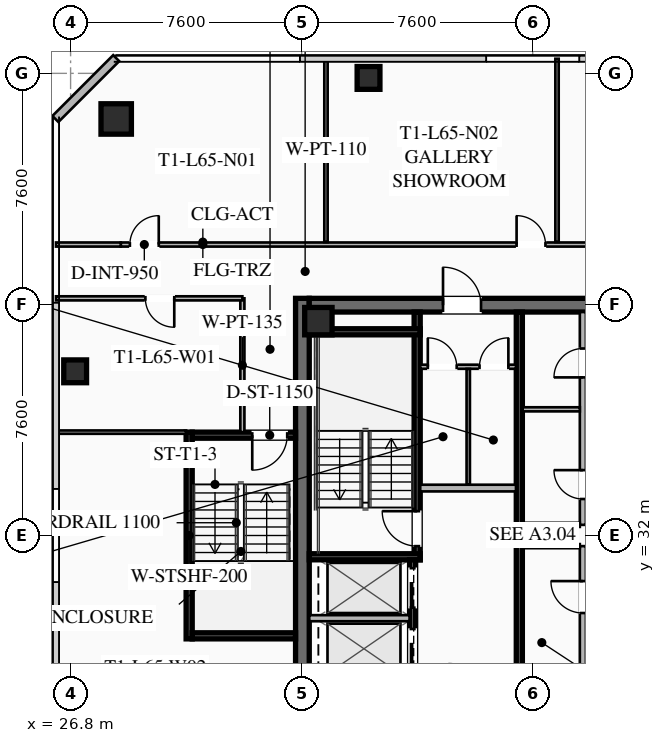
"""IFC4 building model, lengths in metres.
Left out: names, types, materials, properties, quantities, classifications, styles, units other than length and angle.
Written with IfcOpenShell. Run it as: python <this file> out.ifc"""

import sys

from ifc_helpers import new_model, si_unit, direction, frame, frame_2d, origin, origin_2d, place, context, subcontext, project, spatial, rectangle, hollow_rectangle, extrude, element, fill, save


model = new_model("IFC4")
c1 = context("Model", 3, precision=1e-05, world=origin(), true_north=direction((0.0, 1.0)))
c2 = subcontext(c1, "Body", "Model", "MODEL_VIEW")
j1 = project(units=[si_unit("LENGTHUNIT", "METRE"), si_unit("PLANEANGLEUNIT", "RADIAN")], contexts=[c1])
p1 = place(None, origin())
s1 = spatial("IfcSite", under=j1, at=p1, CompositionType="ELEMENT")
p2 = place(p1, origin())
s2 = spatial("IfcBuilding", under=s1, at=p2, CompositionType="ELEMENT")
p3 = place(p2, frame((0.0, 0.0, 239.7)))
s3 = spatial("IfcBuildingStorey", under=s2, at=p3, CompositionType="ELEMENT", Elevation=239.7)
p4 = place(p3, frame((34.425, 24.2, 0.0), z_axis=(0.0, 0.0, 1.0), x_axis=(0.0, 1.0, 0.0)))
e1 = element("IfcWall", 1, at=p4, inside=s3, PredefinedType="SHEAR", context=c2, shape_type="SweptSolid", body=[
    extrude(rectangle(XDim=15.6, YDim=0.45, at=frame_2d((7.8, 0.0))), origin(), (0.0, 0.0, 1.0), 3.55),
])
p5 = place(p3, frame((34.65, 39.575, 0.0), z_axis=(0.0, 0.0, 1.0), x_axis=(1.0, 0.0, 0.0)))
e2 = element("IfcWall", 2, at=p5, inside=s3, PredefinedType="SHEAR", context=c2, shape_type="SweptSolid", body=[
    extrude(rectangle(XDim=14.7, YDim=0.45, at=frame_2d((7.35, 0.0))), origin(), (0.0, 0.0, 1.0), 3.55),
])
p6 = place(p5, frame((4.4, 0.0, 0.0)))
e3 = element("IfcOpeningElement", 3, at=p6, cuts=e2, PredefinedType="OPENING", context=c2, shape_type="SweptSolid", body=[
    extrude(rectangle(XDim=1.25, YDim=2.25, at=frame_2d((0.625, 1.125))), frame((0.0, 0.235, 0.0), z_axis=(0.0, -1.0, 0.0), x_axis=(1.0, 0.0, 0.0)), (0.0, 0.0, 1.0), 0.47),
])
p7 = place(p5, frame((9.45, 0.0, 0.0)))
e4 = element("IfcOpeningElement", 4, at=p7, cuts=e2, PredefinedType="OPENING", context=c2, shape_type="SweptSolid", body=[
    extrude(rectangle(XDim=1.25, YDim=2.25, at=frame_2d((0.625, 1.125))), frame((0.0, 0.235, 0.0), z_axis=(0.0, -1.0, 0.0), x_axis=(1.0, 0.0, 0.0)), (0.0, 0.0, 1.0), 0.47),
])
p8 = place(p3, frame((34.95, 39.05, 0.0), z_axis=(0.0, 0.0, 1.0), x_axis=(1.0, 0.0, 0.0)))
e5 = element("IfcColumn", 5, at=p8, inside=s3, PredefinedType="COLUMN", context=c2, shape_type="SweptSolid", body=[
    extrude(hollow_rectangle(XDim=0.9, YDim=0.9, WallThickness=0.04, at=origin_2d()), origin(), (0.0, 0.0, 1.0), 3.37),
])
p9 = place(p3, frame((28.3, 45.7, 0.0), z_axis=(0.0, 0.0, 1.0), x_axis=(1.0, 0.0, 0.0)))
e6 = element("IfcColumn", 6, at=p9, inside=s3, PredefinedType="COLUMN", context=c2, shape_type="SweptSolid", body=[
    extrude(hollow_rectangle(XDim=1.0, YDim=1.0, WallThickness=0.04, at=origin_2d()), origin(), (0.0, 0.0, 1.0), 3.37),
])
for number, where, z_axis, x_axis in (
    (7, (36.6, 47.05, 0.0), (0.0, 0.0, 1.0), (1.0, 0.0, 0.0)),
    (8, (26.95, 37.4, 0.0), (0.0, 0.0, 1.0), (1.0, 0.0, 0.0)),
):
    element("IfcColumn", number, at=place(p3, frame(where, z_axis=z_axis, x_axis=x_axis)), inside=s3, PredefinedType="COLUMN", context=c2, shape_type="SweptSolid", body=[
        extrude(hollow_rectangle(XDim=0.75, YDim=0.75, WallThickness=0.032, at=origin_2d()), origin(), (0.0, 0.0, 1.0), 3.37),
    ])
p10 = place(p3, frame((26.3, 45.7, 0.0), z_axis=(0.0, 0.0, 1.0), x_axis=(0.707106781187, 0.707106781187, 0.0)))
e9 = element("IfcWall", 9, at=p10, inside=s3, PredefinedType="SOLIDWALL", context=c2, shape_type="SweptSolid", body=[
    extrude(rectangle(XDim=2.828, YDim=0.28, at=frame_2d((1.414, 0.0))), origin(), (0.0, 0.0, 1.0), 3.37),
])
p11 = place(p3, frame((38.2, 31.2, 0.0), z_axis=(0.0, 0.0, 1.0), x_axis=(0.0, 1.0, 0.0)))
e10 = element("IfcWall", 10, at=p11, inside=s3, PredefinedType="SHEAR", context=c2, shape_type="SweptSolid", body=[
    extrude(rectangle(XDim=8.15, YDim=0.2, at=frame_2d((4.075, 0.0))), origin(), (0.0, 0.0, 1.0), 3.37),
])
p12 = place(p11, frame((0.45, 0.0, 0.0)))
e11 = element("IfcOpeningElement", 11, at=p12, cuts=e10, PredefinedType="OPENING", context=c2, shape_type="SweptSolid", body=[
    extrude(rectangle(XDim=1.15, YDim=2.2, at=frame_2d((0.575, 1.1))), frame((0.0, 0.11, 0.0), z_axis=(0.0, -1.0, 0.0), x_axis=(1.0, 0.0, 0.0)), (0.0, 0.0, 1.0), 0.22),
])
for number, where, z_axis, x_axis in (
    (12, (34.65, 31.3, 0.0), (0.0, 0.0, 1.0), (1.0, 0.0, 0.0)),
    (13, (34.65, 38.7, 0.0), (0.0, 0.0, 1.0), (1.0, 0.0, 0.0)),
):
    element("IfcWall", number, at=place(p3, frame(where, z_axis=z_axis, x_axis=x_axis)), inside=s3, PredefinedType="SHEAR", context=c2, shape_type="SweptSolid", body=[
        extrude(rectangle(XDim=3.65, YDim=0.2, at=frame_2d((1.825, 0.0))), origin(), (0.0, 0.0, 1.0), 3.37),
    ])
p13 = place(p3, frame((41.56, 24.65, 0.0), z_axis=(0.0, 0.0, 1.0), x_axis=(0.0, 1.0, 0.0)))
e14 = element("IfcWall", 14, at=p13, inside=s3, PredefinedType="SHEAR", context=c2, shape_type="SweptSolid", body=[
    extrude(rectangle(XDim=14.7, YDim=0.2, at=frame_2d((7.35, 0.0))), origin(), (0.0, 0.0, 1.0), 3.37),
])
p14 = place(p3, frame((38.3, 33.56, 0.0), z_axis=(0.0, 0.0, 1.0), x_axis=(1.0, 0.0, 0.0)))
e15 = element("IfcWall", 15, at=p14, inside=s3, PredefinedType="SOLIDWALL", context=c2, shape_type="SweptSolid", body=[
    extrude(rectangle(XDim=3.15, YDim=0.22, at=frame_2d((1.575, 0.0))), origin(), (0.0, 0.0, 1.0), 2.723),
])
p15 = place(p3, frame((38.05, 24.65, 0.0), z_axis=(0.0, 0.0, 1.0), x_axis=(0.0, 1.0, 0.0)))
e16 = element("IfcWall", 16, at=p15, inside=s3, PredefinedType="SHEAR", context=c2, shape_type="SweptSolid", body=[
    extrude(rectangle(XDim=6.55, YDim=0.2, at=frame_2d((3.275, 0.0))), origin(), (0.0, 0.0, 1.0), 3.37),
])
p16 = place(p15, frame((4.975, 0.0, 0.0)))
e17 = element("IfcOpeningElement", 17, at=p16, cuts=e16, PredefinedType="OPENING", context=c2, shape_type="SweptSolid", body=[
    extrude(rectangle(XDim=1.3, YDim=2.25, at=frame_2d((0.65, 1.125))), frame((0.0, 0.11, 0.0), z_axis=(0.0, -1.0, 0.0), x_axis=(1.0, 0.0, 0.0)), (0.0, 0.0, 1.0), 0.22),
])
p17 = place(p15, frame((2.975, 0.0, 0.0)))
e18 = element("IfcOpeningElement", 18, at=p17, cuts=e16, PredefinedType="OPENING", context=c2, shape_type="SweptSolid", body=[
    extrude(rectangle(XDim=1.3, YDim=2.25, at=frame_2d((0.65, 1.125))), frame((0.0, 0.11, 0.0), z_axis=(0.0, -1.0, 0.0), x_axis=(1.0, 0.0, 0.0)), (0.0, 0.0, 1.0), 0.22),
])
p18 = place(p15, frame((0.775, 0.0, 0.0)))
e19 = element("IfcOpeningElement", 19, at=p18, cuts=e16, PredefinedType="OPENING", context=c2, shape_type="SweptSolid", body=[
    extrude(rectangle(XDim=1.3, YDim=2.25, at=frame_2d((0.65, 1.125))), frame((0.0, 0.11, 0.0), z_axis=(0.0, -1.0, 0.0), x_axis=(1.0, 0.0, 0.0)), (0.0, 0.0, 1.0), 0.22),
])
p19 = place(p3, frame((34.65, 29.28, 0.0), z_axis=(0.0, 0.0, 1.0), x_axis=(1.0, 0.0, 0.0)))
e20 = element("IfcWall", 20, at=p19, inside=s3, PredefinedType="SOLIDWALL", context=c2, shape_type="SweptSolid", body=[
    extrude(rectangle(XDim=3.3, YDim=0.2, at=frame_2d((1.65, 0.0))), origin(), (0.0, 0.0, 1.0), 3.37),
])
p20 = place(p3, frame((38.3, 37.55, 0.0), z_axis=(0.0, 0.0, 1.0), x_axis=(1.0, 0.0, 0.0)))
e21 = element("IfcWall", 21, at=p20, inside=s3, PredefinedType="PARTITIONING", context=c2, shape_type="SweptSolid", body=[
    extrude(rectangle(XDim=3.15, YDim=0.135, at=frame_2d((1.575, 0.0))), origin(), (0.0, 0.0, 1.0), 2.723),
])
p21 = place(p20, frame((0.25, 0.0, 0.0)))
e22 = element("IfcOpeningElement", 22, at=p21, cuts=e21, PredefinedType="OPENING", context=c2, shape_type="SweptSolid", body=[
    extrude(rectangle(XDim=0.95, YDim=2.05, at=frame_2d((0.475, 1.025))), frame((0.0, 0.077, 0.0), z_axis=(0.0, -1.0, 0.0), x_axis=(1.0, 0.0, 0.0)), (0.0, 0.0, 1.0), 0.155),
])
p22 = place(p20, frame((1.95, 0.0, 0.0)))
e23 = element("IfcOpeningElement", 23, at=p22, cuts=e21, PredefinedType="OPENING", context=c2, shape_type="SweptSolid", body=[
    extrude(rectangle(XDim=0.95, YDim=2.05, at=frame_2d((0.475, 1.025))), frame((0.0, 0.077, 0.0), z_axis=(0.0, -1.0, 0.0), x_axis=(1.0, 0.0, 0.0)), (0.0, 0.0, 1.0), 0.155),
])
p23 = place(p3, frame((39.88, 33.68, 0.0), z_axis=(0.0, 0.0, 1.0), x_axis=(0.0, 1.0, 0.0)))
e24 = element("IfcWall", 24, at=p23, inside=s3, PredefinedType="PARTITIONING", context=c2, shape_type="SweptSolid", body=[
    extrude(rectangle(XDim=3.8, YDim=0.11, at=frame_2d((1.9, 0.0))), origin(), (0.0, 0.0, 1.0), 2.723),
])
p24 = place(p3, frame((43.65, 24.65, 0.0), z_axis=(0.0, 0.0, 1.0), x_axis=(0.0, 1.0, 0.0)))
e25 = element("IfcWall", 25, at=p24, inside=s3, PredefinedType="SOLIDWALL", context=c2, shape_type="SweptSolid", body=[
    extrude(rectangle(XDim=7.0, YDim=0.2, at=frame_2d((3.5, 0.0))), origin(), (0.0, 0.0, 1.0), 2.723),
])
p25 = place(p24, frame((0.85, 0.0, 0.0)))
e26 = element("IfcOpeningElement", 26, at=p25, cuts=e25, PredefinedType="OPENING", context=c2, shape_type="SweptSolid", body=[
    extrude(rectangle(XDim=0.95, YDim=2.05, at=frame_2d((0.475, 1.025))), frame((0.0, 0.11, 0.0), z_axis=(0.0, -1.0, 0.0), x_axis=(1.0, 0.0, 0.0)), (0.0, 0.0, 1.0), 0.22),
])
p26 = place(p24, frame((4.8, 0.0, 0.0)))
e27 = element("IfcOpeningElement", 27, at=p26, cuts=e25, PredefinedType="OPENING", context=c2, shape_type="SweptSolid", body=[
    extrude(rectangle(XDim=1.05, YDim=2.2, at=frame_2d((0.525, 1.1))), frame((0.0, 0.11, 0.0), z_axis=(0.0, -1.0, 0.0), x_axis=(1.0, 0.0, 0.0)), (0.0, 0.0, 1.0), 0.22),
])
p27 = place(p3, frame((41.67, 31.65, 0.0), z_axis=(0.0, 0.0, 1.0), x_axis=(1.0, 0.0, 0.0)))
e28 = element("IfcWall", 28, at=p27, inside=s3, PredefinedType="PARTITIONING", context=c2, shape_type="SweptSolid", body=[
    extrude(rectangle(XDim=1.88, YDim=0.135, at=frame_2d((0.94, 0.0))), origin(), (0.0, 0.0, 1.0), 2.723),
])
p28 = place(p3, frame((43.65, 32.35, 0.0), z_axis=(0.0, 0.0, 1.0), x_axis=(0.0, 1.0, 0.0)))
e29 = element("IfcWall", 29, at=p28, inside=s3, PredefinedType="SOLIDWALL", context=c2, shape_type="SweptSolid", body=[
    extrude(rectangle(XDim=7.0, YDim=0.2, at=frame_2d((3.5, 0.0))), origin(), (0.0, 0.0, 1.0), 2.723),
])
p29 = place(p28, frame((0.85, 0.0, 0.0)))
e30 = element("IfcOpeningElement", 30, at=p29, cuts=e29, PredefinedType="OPENING", context=c2, shape_type="SweptSolid", body=[
    extrude(rectangle(XDim=0.95, YDim=2.05, at=frame_2d((0.475, 1.025))), frame((0.0, 0.11, 0.0), z_axis=(0.0, -1.0, 0.0), x_axis=(1.0, 0.0, 0.0)), (0.0, 0.0, 1.0), 0.22),
])
p30 = place(p28, frame((4.85, 0.0, 0.0)))
e31 = element("IfcOpeningElement", 31, at=p30, cuts=e29, PredefinedType="OPENING", context=c2, shape_type="SweptSolid", body=[
    extrude(rectangle(XDim=0.95, YDim=2.05, at=frame_2d((0.475, 1.025))), frame((0.0, 0.11, 0.0), z_axis=(0.0, -1.0, 0.0), x_axis=(1.0, 0.0, 0.0)), (0.0, 0.0, 1.0), 0.22),
])
for number, where, z_axis, x_axis in (
    (32, (41.67, 32.35, 0.0), (0.0, 0.0, 1.0), (1.0, 0.0, 0.0)),
    (33, (41.67, 36.15, 0.0), (0.0, 0.0, 1.0), (1.0, 0.0, 0.0)),
):
    element("IfcWall", number, at=place(p3, frame(where, z_axis=z_axis, x_axis=x_axis)), inside=s3, PredefinedType="PARTITIONING", context=c2, shape_type="SweptSolid", body=[
        extrude(rectangle(XDim=1.88, YDim=0.135, at=frame_2d((0.94, 0.0))), origin(), (0.0, 0.0, 1.0), 2.723),
    ])
p31 = place(p3, frame((30.7, 28.6, 0.0), z_axis=(0.0, 0.0, 1.0), x_axis=(0.0, 1.0, 0.0)))
e34 = element("IfcWall", 34, at=p31, inside=s3, PredefinedType="SHEAR", context=c2, shape_type="SweptSolid", body=[
    extrude(rectangle(XDim=6.8, YDim=0.2, at=frame_2d((3.4, 0.0))), origin(), (0.0, 0.0, 1.0), 3.37),
])
p32 = place(p3, frame((34.2, 35.3, 0.0), z_axis=(0.0, 0.0, 1.0), x_axis=(-1.0, 0.0, 0.0)))
e35 = element("IfcWall", 35, at=p32, inside=s3, PredefinedType="SHEAR", context=c2, shape_type="SweptSolid", body=[
    extrude(rectangle(XDim=3.4, YDim=0.2, at=frame_2d((1.7, 0.0))), origin(), (0.0, 0.0, 1.0), 3.37),
])
p33 = place(p32, frame((0.275, 0.0, 0.0)))
e36 = element("IfcOpeningElement", 36, at=p33, cuts=e35, PredefinedType="OPENING", context=c2, shape_type="SweptSolid", body=[
    extrude(rectangle(XDim=1.15, YDim=2.2, at=frame_2d((0.575, 1.1))), frame((0.0, 0.11, 0.0), z_axis=(0.0, -1.0, 0.0), x_axis=(1.0, 0.0, 0.0)), (0.0, 0.0, 1.0), 0.22),
])
p34 = place(p3, frame((30.8, 28.7, 0.0), z_axis=(0.0, 0.0, 1.0), x_axis=(1.0, 0.0, 0.0)))
e37 = element("IfcWall", 37, at=p34, inside=s3, PredefinedType="SHEAR", context=c2, shape_type="SweptSolid", body=[
    extrude(rectangle(XDim=3.4, YDim=0.2, at=frame_2d((1.7, 0.0))), origin(), (0.0, 0.0, 1.0), 3.37),
])
p35 = place(p3, frame((32.45, 35.4, 0.0), z_axis=(0.0, 0.0, 1.0), x_axis=(0.0, 1.0, 0.0)))
e38 = element("IfcWall", 38, at=p35, inside=s3, PredefinedType="PARTITIONING", context=c2, shape_type="SweptSolid", body=[
    extrude(rectangle(XDim=4.4, YDim=0.135, at=frame_2d((2.2, 0.0))), origin(), (0.0, 0.0, 1.0), 2.723),
])
p36 = place(p3, frame((28.45, 41.57, 0.0), z_axis=(0.0, 0.0, 1.0), x_axis=(1.0, 0.0, 0.0)))
e39 = element("IfcWall", 39, at=p36, inside=s3, PredefinedType="PARTITIONING", context=c2, shape_type="SweptSolid", body=[
    extrude(rectangle(XDim=27.1, YDim=0.135, at=frame_2d((13.55, 0.0))), origin(), (0.0, 0.0, 1.0), 2.723),
])
p37 = place(p36, frame((0.3, 0.0, 0.0)))
e40 = element("IfcOpeningElement", 40, at=p37, cuts=e39, PredefinedType="OPENING", context=c2, shape_type="SweptSolid", body=[
    extrude(rectangle(XDim=0.95, YDim=2.05, at=frame_2d((0.475, 1.025))), frame((0.0, 0.077, 0.0), z_axis=(0.0, -1.0, 0.0), x_axis=(1.0, 0.0, 0.0)), (0.0, 0.0, 1.0), 0.155),
])
p38 = place(p36, frame((13.02, 0.0, 0.0)))
e41 = element("IfcOpeningElement", 41, at=p38, cuts=e39, PredefinedType="OPENING", context=c2, shape_type="SweptSolid", body=[
    extrude(rectangle(XDim=0.95, YDim=2.05, at=frame_2d((0.475, 1.025))), frame((0.0, 0.077, 0.0), z_axis=(0.0, -1.0, 0.0), x_axis=(1.0, 0.0, 0.0)), (0.0, 0.0, 1.0), 0.155),
])
p39 = place(p36, frame((17.021, 0.0, 0.0)))
e42 = element("IfcOpeningElement", 42, at=p39, cuts=e39, PredefinedType="OPENING", context=c2, shape_type="SweptSolid", body=[
    extrude(rectangle(XDim=0.95, YDim=2.05, at=frame_2d((0.475, 1.025))), frame((0.0, 0.077, 0.0), z_axis=(0.0, -1.0, 0.0), x_axis=(1.0, 0.0, 0.0)), (0.0, 0.0, 1.0), 0.155),
])
p40 = place(p36, frame((25.85, 0.0, 0.0)))
e43 = element("IfcOpeningElement", 43, at=p40, cuts=e39, PredefinedType="OPENING", context=c2, shape_type="SweptSolid", body=[
    extrude(rectangle(XDim=0.95, YDim=2.05, at=frame_2d((0.475, 1.025))), frame((0.0, 0.077, 0.0), z_axis=(0.0, -1.0, 0.0), x_axis=(1.0, 0.0, 0.0)), (0.0, 0.0, 1.0), 0.155),
])
p41 = place(p3, frame((26.32, 41.57, 0.0), z_axis=(0.0, 0.0, 1.0), x_axis=(1.0, 0.0, 0.0)))
e44 = element("IfcWall", 44, at=p41, inside=s3, PredefinedType="PARTITIONING", context=c2, shape_type="SweptSolid", body=[
    extrude(rectangle(XDim=2.13, YDim=0.135, at=frame_2d((1.065, 0.0))), origin(), (0.0, 0.0, 1.0), 2.723),
])
for number, where, z_axis, x_axis in (
    (45, (35.2, 41.65, 0.0), (0.0, 0.0, 1.0), (0.0, 1.0, 0.0)),
    (46, (42.8, 41.65, 0.0), (0.0, 0.0, 1.0), (0.0, 1.0, 0.0)),
):
    element("IfcWall", number, at=place(p3, frame(where, z_axis=z_axis, x_axis=x_axis)), inside=s3, PredefinedType="PARTITIONING", context=c2, shape_type="SweptSolid", body=[
        extrude(rectangle(XDim=6.03, YDim=0.11, at=frame_2d((3.015, 0.0))), origin(), (0.0, 0.0, 1.0), 2.723),
    ])
p42 = place(p3, frame((32.45, 39.8, 0.0), z_axis=(0.0, 0.0, 1.0), x_axis=(-1.0, 0.0, 0.0)))
e47 = element("IfcWall", 47, at=p42, inside=s3, PredefinedType="PARTITIONING", context=c2, shape_type="SweptSolid", body=[
    extrude(rectangle(XDim=6.13, YDim=0.135, at=frame_2d((3.065, 0.0))), origin(), (0.0, 0.0, 1.0), 2.723),
])
p43 = place(p42, frame((2.24, 0.0, 0.0)))
e48 = element("IfcOpeningElement", 48, at=p43, cuts=e47, PredefinedType="OPENING", context=c2, shape_type="SweptSolid", body=[
    extrude(rectangle(XDim=0.95, YDim=2.05, at=frame_2d((0.475, 1.025))), frame((0.0, 0.077, 0.0), z_axis=(0.0, -1.0, 0.0), x_axis=(1.0, 0.0, 0.0)), (0.0, 0.0, 1.0), 0.155),
])
p44 = place(p3, frame((30.6, 35.4, 0.0), z_axis=(0.0, 0.0, 1.0), x_axis=(-1.0, 0.0, 0.0)))
e49 = element("IfcWall", 49, at=p44, inside=s3, PredefinedType="PARTITIONING", context=c2, shape_type="SweptSolid", body=[
    extrude(rectangle(XDim=4.28, YDim=0.11, at=frame_2d((2.14, 0.0))), origin(), (0.0, 0.0, 1.0), 2.723),
])
p45 = place(p6, origin())
e50 = element("IfcDoor", 50, at=p45, inside=s3, OperationType="SINGLE_SWING_LEFT", PredefinedType="DOOR", context=c2, shape_type="SweptSolid", body=[
    extrude(rectangle(XDim=1.25, YDim=2.25, at=frame_2d((0.625, 1.125))), frame((0.0, 0.025, 0.0), z_axis=(0.0, -1.0, 0.0), x_axis=(1.0, 0.0, 0.0)), (0.0, 0.0, 1.0), 0.05),
])
fill(e3, e50)
p46 = place(p12, origin())
e51 = element("IfcDoor", 51, at=p46, inside=s3, OperationType="SINGLE_SWING_RIGHT", PredefinedType="DOOR", context=c2, shape_type="SweptSolid", body=[
    extrude(rectangle(XDim=1.15, YDim=2.2, at=frame_2d((0.575, 1.1))), frame((0.0, 0.025, 0.0), z_axis=(0.0, -1.0, 0.0), x_axis=(1.0, 0.0, 0.0)), (0.0, 0.0, 1.0), 0.05),
])
fill(e11, e51)
p47 = place(p21, origin())
e52 = element("IfcDoor", 52, at=p47, inside=s3, OperationType="SINGLE_SWING_LEFT", PredefinedType="DOOR", context=c2, shape_type="SweptSolid", body=[
    extrude(rectangle(XDim=0.95, YDim=2.05, at=frame_2d((0.475, 1.025))), frame((0.0, 0.025, 0.0), z_axis=(0.0, -1.0, 0.0), x_axis=(1.0, 0.0, 0.0)), (0.0, 0.0, 1.0), 0.05),
])
fill(e22, e52)
p48 = place(p22, origin())
e53 = element("IfcDoor", 53, at=p48, inside=s3, OperationType="SINGLE_SWING_RIGHT", PredefinedType="DOOR", context=c2, shape_type="SweptSolid", body=[
    extrude(rectangle(XDim=0.95, YDim=2.05, at=frame_2d((0.475, 1.025))), frame((0.0, 0.025, 0.0), z_axis=(0.0, -1.0, 0.0), x_axis=(1.0, 0.0, 0.0)), (0.0, 0.0, 1.0), 0.05),
])
fill(e23, e53)
p49 = place(p26, origin())
e54 = element("IfcDoor", 54, at=p49, inside=s3, OperationType="SINGLE_SWING_RIGHT", PredefinedType="DOOR", context=c2, shape_type="SweptSolid", body=[
    extrude(rectangle(XDim=1.05, YDim=2.2, at=frame_2d((0.525, 1.1))), frame((0.0, 0.025, 0.0), z_axis=(0.0, -1.0, 0.0), x_axis=(1.0, 0.0, 0.0)), (0.0, 0.0, 1.0), 0.05),
])
fill(e27, e54)
p50 = place(p29, origin())
e55 = element("IfcDoor", 55, at=p50, inside=s3, OperationType="SINGLE_SWING_RIGHT", PredefinedType="DOOR", context=c2, shape_type="SweptSolid", body=[
    extrude(rectangle(XDim=0.95, YDim=2.05, at=frame_2d((0.475, 1.025))), frame((0.0, 0.025, 0.0), z_axis=(0.0, -1.0, 0.0), x_axis=(1.0, 0.0, 0.0)), (0.0, 0.0, 1.0), 0.05),
])
fill(e30, e55)
p51 = place(p30, origin())
e56 = element("IfcDoor", 56, at=p51, inside=s3, OperationType="SINGLE_SWING_LEFT", PredefinedType="DOOR", context=c2, shape_type="SweptSolid", body=[
    extrude(rectangle(XDim=0.95, YDim=2.05, at=frame_2d((0.475, 1.025))), frame((0.0, 0.025, 0.0), z_axis=(0.0, -1.0, 0.0), x_axis=(1.0, 0.0, 0.0)), (0.0, 0.0, 1.0), 0.05),
])
fill(e31, e56)
p52 = place(p33, origin())
e57 = element("IfcDoor", 57, at=p52, inside=s3, OperationType="SINGLE_SWING_RIGHT", PredefinedType="DOOR", context=c2, shape_type="SweptSolid", body=[
    extrude(rectangle(XDim=1.15, YDim=2.2, at=frame_2d((0.575, 1.1))), frame((0.0, 0.025, 0.0), z_axis=(0.0, -1.0, 0.0), x_axis=(1.0, 0.0, 0.0)), (0.0, 0.0, 1.0), 0.05),
])
fill(e36, e57)
p53 = place(p37, origin())
e58 = element("IfcDoor", 58, at=p53, inside=s3, OperationType="SINGLE_SWING_RIGHT", PredefinedType="DOOR", context=c2, shape_type="SweptSolid", body=[
    extrude(rectangle(XDim=0.95, YDim=2.05, at=frame_2d((0.475, 1.025))), frame((0.0, 0.025, 0.0), z_axis=(0.0, -1.0, 0.0), x_axis=(1.0, 0.0, 0.0)), (0.0, 0.0, 1.0), 0.05),
])
fill(e40, e58)
p54 = place(p38, origin())
e59 = element("IfcDoor", 59, at=p54, inside=s3, OperationType="SINGLE_SWING_LEFT", PredefinedType="DOOR", context=c2, shape_type="SweptSolid", body=[
    extrude(rectangle(XDim=0.95, YDim=2.05, at=frame_2d((0.475, 1.025))), frame((0.0, 0.025, 0.0), z_axis=(0.0, -1.0, 0.0), x_axis=(1.0, 0.0, 0.0)), (0.0, 0.0, 1.0), 0.05),
])
fill(e41, e59)
p55 = place(p43, origin())
e60 = element("IfcDoor", 60, at=p55, inside=s3, OperationType="SINGLE_SWING_LEFT", PredefinedType="DOOR", context=c2, shape_type="SweptSolid", body=[
    extrude(rectangle(XDim=0.95, YDim=2.05, at=frame_2d((0.475, 1.025))), frame((0.0, 0.025, 0.0), z_axis=(0.0, -1.0, 0.0), x_axis=(1.0, 0.0, 0.0)), (0.0, 0.0, 1.0), 0.05),
])
fill(e48, e60)
p56 = place(p16, origin())
e61 = element("IfcDoor", 61, at=p56, inside=s3, OperationType="SLIDING_TO_LEFT", PredefinedType="DOOR", context=c2, shape_type="SweptSolid", body=[
    extrude(rectangle(XDim=1.3, YDim=2.25, at=frame_2d((0.65, 1.125))), frame((0.0, 0.025, 0.0), z_axis=(0.0, -1.0, 0.0), x_axis=(1.0, 0.0, 0.0)), (0.0, 0.0, 1.0), 0.05),
])
fill(e17, e61)
p57 = place(p17, origin())
e62 = element("IfcDoor", 62, at=p57, inside=s3, OperationType="SLIDING_TO_LEFT", PredefinedType="DOOR", context=c2, shape_type="SweptSolid", body=[
    extrude(rectangle(XDim=1.3, YDim=2.25, at=frame_2d((0.65, 1.125))), frame((0.0, 0.025, 0.0), z_axis=(0.0, -1.0, 0.0), x_axis=(1.0, 0.0, 0.0)), (0.0, 0.0, 1.0), 0.05),
])
fill(e18, e62)
save(model, sys.argv[1])
